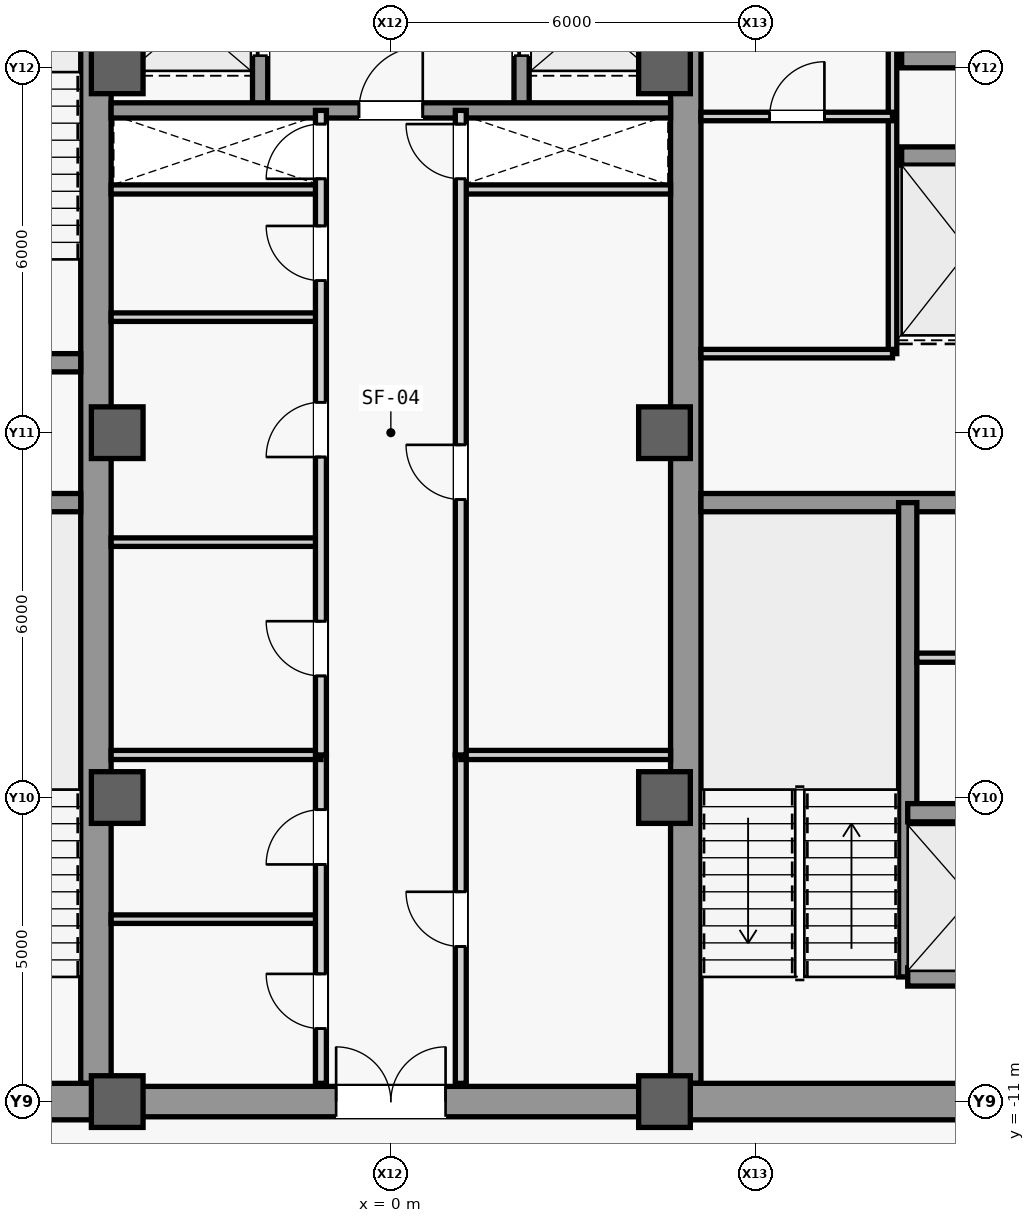
"""IFC4 building model, lengths in metres.
Left out: names, types, materials, properties, quantities, classifications, styles, units other than length and angle.
Written with IfcOpenShell. Run it as: python <this file> out.ifc"""

import sys

from ifc_helpers import new_model, si_unit, direction, frame, frame_2d, origin, origin_2d, place, context, subcontext, project, spatial, rectangle, extrude, source, transform, mapped, element, fill, save


model = new_model("IFC4")
c1 = context("Model", 3, precision=1e-05, world=origin(), true_north=direction((0.0, 1.0)))
c2 = subcontext(c1, "Body", "Model", "MODEL_VIEW")
j1 = project(units=[si_unit("LENGTHUNIT", "METRE"), si_unit("PLANEANGLEUNIT", "RADIAN")], contexts=[c1])
p1 = place(None, origin())
s1 = spatial("IfcSite", under=j1, at=p1, CompositionType="ELEMENT")
p2 = place(p1, origin())
s2 = spatial("IfcBuilding", under=s1, at=p2, CompositionType="ELEMENT")
p3 = place(p2, frame((0.0, 0.0, 259.1)))
s3 = spatial("IfcBuildingStorey", under=s2, at=p3, CompositionType="ELEMENT", Elevation=259.1)
m1 = source(origin(), c2, "Body", "SweptSolid", [
    extrude(rectangle(XDim=21.4, YDim=0.5, at=frame_2d((10.7, 0.0))), origin(), (0.0, 0.0, 1.0), 3.78),
])
for number, where, z_axis, x_axis in (
    (1, (-4.85, -10.7, 0.0), (0.0, 0.0, 1.0), (0.0, 1.0, 0.0)),
    (2, (4.85, -10.7, 0.0), (0.0, 0.0, 1.0), (0.0, 1.0, 0.0)),
):
    element("IfcWall", number, at=place(p3, frame(where, z_axis=z_axis, x_axis=x_axis)), inside=s3, PredefinedType="SHEAR", context=c2, shape_type="MappedRepresentation", body=[
        mapped(m1, transform((0.0, 0.0, 0.0), scale=1.0)),
    ])
m2 = source(origin(), c2, "Body", "SweptSolid", [
    extrude(rectangle(XDim=5.9, YDim=0.6, at=frame_2d((2.95, 0.0))), origin(), (0.0, 0.0, 1.0), 3.78),
])
for number, where, z_axis, x_axis in (
    (3, (-10.75, -11.0, 0.0), (0.0, 0.0, 1.0), (1.0, 0.0, 0.0)),
    (4, (4.85, -11.0, 0.0), (0.0, 0.0, 1.0), (1.0, 0.0, 0.0)),
):
    element("IfcWall", number, at=place(p3, frame(where, z_axis=z_axis, x_axis=x_axis)), inside=s3, PredefinedType="SHEAR", context=c2, shape_type="MappedRepresentation", body=[
        mapped(m2, transform((0.0, 0.0, 0.0), scale=1.0)),
    ])
m3 = source(origin(), c2, "Body", "SweptSolid", [
    extrude(rectangle(XDim=5.65, YDim=0.3, at=frame_2d((2.825, 0.0))), origin(), (0.0, 0.0, 1.0), 3.78),
])
for number, where, z_axis, x_axis in (
    (5, (-10.75, -1.15, 0.0), (0.0, 0.0, 1.0), (1.0, 0.0, 0.0)),
    (6, (-10.75, 1.15, 0.0), (0.0, 0.0, 1.0), (1.0, 0.0, 0.0)),
    (7, (5.1, -1.15, 0.0), (0.0, 0.0, 1.0), (1.0, 0.0, 0.0)),
):
    element("IfcWall", number, at=place(p3, frame(where, z_axis=z_axis, x_axis=x_axis)), inside=s3, PredefinedType="SHEAR", context=c2, shape_type="MappedRepresentation", body=[
        mapped(m3, transform((0.0, 0.0, 0.0), scale=1.0)),
    ])
m4 = source(origin(), c2, "Body", "SweptSolid", [
    extrude(rectangle(XDim=9.2, YDim=0.5, at=frame_2d((4.6, 0.0))), origin(), (0.0, 0.0, 1.0), 3.78),
])
p4 = place(p3, frame((-4.6, -11.0, 0.0), z_axis=(0.0, 0.0, 1.0), x_axis=(1.0, 0.0, 0.0)))
e8 = element("IfcWall", 8, at=p4, inside=s3, PredefinedType="SHEAR", context=c2, shape_type="MappedRepresentation", body=[
    mapped(m4, transform((0.0, 0.0, 0.0), scale=1.0)),
])
m5 = source(origin(), c2, "Body", "SweptSolid", [
    extrude(rectangle(XDim=1.8, YDim=2.25, at=frame_2d((0.9, 1.125))), frame((0.0, 0.26, 0.0), z_axis=(0.0, -1.0, 0.0), x_axis=(1.0, 0.0, 0.0)), (0.0, 0.0, 1.0), 0.52),
])
p5 = place(p4, frame((3.7, 0.0, 0.0)))
e9 = element("IfcOpeningElement", 9, at=p5, cuts=e8, PredefinedType="OPENING", context=c2, shape_type="MappedRepresentation", body=[
    mapped(m5, transform((0.0, 0.0, 0.0), scale=1.0)),
])
m6 = source(origin(), c2, "Body", "SweptSolid", [
    extrude(rectangle(XDim=0.85, YDim=0.85, at=origin_2d()), origin(), (0.0, 0.0, 1.0), 4.0),
])
for number, where, z_axis, x_axis in (
    (10, (-4.5, -11.0, 0.0), (0.0, 0.0, 1.0), (1.0, 0.0, 0.0)),
    (11, (-4.5, -6.0, 0.0), (0.0, 0.0, 1.0), (1.0, 0.0, 0.0)),
    (12, (-4.5, 0.0, 0.0), (0.0, 0.0, 1.0), (1.0, 0.0, 0.0)),
    (13, (-4.5, 6.0, 0.0), (0.0, 0.0, 1.0), (1.0, 0.0, 0.0)),
    (14, (4.5, -11.0, 0.0), (0.0, 0.0, 1.0), (1.0, 0.0, 0.0)),
    (15, (4.5, -6.0, 0.0), (0.0, 0.0, 1.0), (1.0, 0.0, 0.0)),
    (16, (4.5, 0.0, 0.0), (0.0, 0.0, 1.0), (1.0, 0.0, 0.0)),
    (17, (4.5, 6.0, 0.0), (0.0, 0.0, 1.0), (1.0, 0.0, 0.0)),
):
    element("IfcColumn", number, at=place(p3, frame(where, z_axis=z_axis, x_axis=x_axis)), inside=s3, PredefinedType="COLUMN", context=c2, shape_type="MappedRepresentation", body=[
        mapped(m6, transform((0.0, 0.0, 0.0), scale=1.0)),
    ])
m7 = source(origin(), c2, "Body", "SweptSolid", [
    extrude(rectangle(XDim=7.8, YDim=0.3, at=frame_2d((3.9, 0.0))), origin(), (0.0, 0.0, 1.0), 3.78),
])
p6 = place(p3, frame((8.5, -8.95, 0.0), z_axis=(0.0, 0.0, 1.0), x_axis=(0.0, 1.0, 0.0)))
e18 = element("IfcWall", 18, at=p6, inside=s3, PredefinedType="SHEAR", context=c2, shape_type="MappedRepresentation", body=[
    mapped(m7, transform((0.0, 0.0, 0.0), scale=1.0)),
])
m8 = source(origin(), c2, "Body", "SweptSolid", [
    extrude(rectangle(XDim=2.2, YDim=0.3, at=frame_2d((1.1, 0.0))), origin(), (0.0, 0.0, 1.0), 3.78),
])
for number, where, z_axis, x_axis in (
    (19, (8.5, -8.95, 0.0), (0.0, 0.0, 1.0), (1.0, 0.0, 0.0)),
    (20, (8.5, -6.25, 0.0), (0.0, 0.0, 1.0), (1.0, 0.0, 0.0)),
):
    element("IfcWall", number, at=place(p3, frame(where, z_axis=z_axis, x_axis=x_axis)), inside=s3, PredefinedType="SHEAR", context=c2, shape_type="MappedRepresentation", body=[
        mapped(m8, transform((0.0, 0.0, 0.0), scale=1.0)),
    ])
m9 = source(origin(), c2, "Body", "SweptSolid", [
    extrude(rectangle(XDim=2.3, YDim=0.3, at=frame_2d((1.15, 0.0))), origin(), (0.0, 0.0, 1.0), 3.78),
])
for number, where, z_axis, x_axis in (
    (21, (8.4, 4.55, 0.0), (0.0, 0.0, 1.0), (1.0, 0.0, 0.0)),
    (22, (8.4, 6.15, 0.0), (0.0, 0.0, 1.0), (1.0, 0.0, 0.0)),
):
    element("IfcWall", number, at=place(p3, frame(where, z_axis=z_axis, x_axis=x_axis)), inside=s3, PredefinedType="SHEAR", context=c2, shape_type="MappedRepresentation", body=[
        mapped(m9, transform((0.0, 0.0, 0.0), scale=1.0)),
    ])
m10 = source(origin(), c2, "Body", "SweptSolid", [
    extrude(rectangle(XDim=2.05, YDim=0.15, at=frame_2d((1.025, 0.0))), origin(), (0.0, 0.0, 1.0), 3.78),
])
p7 = place(p3, frame((8.65, -3.7, 0.0), z_axis=(0.0, 0.0, 1.0), x_axis=(1.0, 0.0, 0.0)))
e23 = element("IfcWall", 23, at=p7, inside=s3, PredefinedType="PARTITIONING", context=c2, shape_type="MappedRepresentation", body=[
    mapped(m10, transform((0.0, 0.0, 0.0), scale=1.0)),
])
m11 = source(origin(), c2, "Body", "SweptSolid", [
    extrude(rectangle(XDim=9.4, YDim=0.14, at=frame_2d((4.7, 0.0))), origin(), (0.0, 0.0, 1.0), 3.78),
])
p8 = place(p3, frame((8.25, 1.3, 0.0), z_axis=(0.0, 0.0, 1.0), x_axis=(0.0, 1.0, 0.0)))
e24 = element("IfcWall", 24, at=p8, inside=s3, PredefinedType="PARTITIONING", context=c2, shape_type="MappedRepresentation", body=[
    mapped(m11, transform((0.0, 0.0, 0.0), scale=1.0)),
])
m12 = source(origin(), c2, "Body", "SweptSolid", [
    extrude(rectangle(XDim=3.15, YDim=0.14, at=frame_2d((1.575, 0.0))), origin(), (0.0, 0.0, 1.0), 3.78),
])
p9 = place(p3, frame((5.1, 1.3, 0.0), z_axis=(0.0, 0.0, 1.0), x_axis=(1.0, 0.0, 0.0)))
e25 = element("IfcWall", 25, at=p9, inside=s3, PredefinedType="PARTITIONING", context=c2, shape_type="MappedRepresentation", body=[
    mapped(m12, transform((0.0, 0.0, 0.0), scale=1.0)),
])
p10 = place(p3, frame((5.1, 5.2, 0.0), z_axis=(0.0, 0.0, 1.0), x_axis=(1.0, 0.0, 0.0)))
e26 = element("IfcWall", 26, at=p10, inside=s3, PredefinedType="PARTITIONING", context=c2, shape_type="MappedRepresentation", body=[
    mapped(m12, transform((0.0, 0.0, 0.0), scale=1.0)),
])
m13 = source(origin(), c2, "Body", "SweptSolid", [
    extrude(rectangle(XDim=0.9, YDim=2.15, at=frame_2d((0.45, 1.075))), frame((0.0, 0.08, 0.0), z_axis=(0.0, -1.0, 0.0), x_axis=(1.0, 0.0, 0.0)), (0.0, 0.0, 1.0), 0.16),
])
p11 = place(p10, frame((1.13, 0.0, 0.0)))
e27 = element("IfcOpeningElement", 27, at=p11, cuts=e26, PredefinedType="OPENING", context=c2, shape_type="MappedRepresentation", body=[
    mapped(m13, transform((0.0, 0.0, 0.0), scale=1.0)),
])
m14 = source(origin(), c2, "Body", "SweptSolid", [
    extrude(rectangle(XDim=3.45, YDim=0.15, at=frame_2d((1.725, 0.0))), origin(), (0.0, 0.0, 1.0), 3.78),
])
for number, where, z_axis, x_axis in (
    (28, (-4.6, 4.0, 0.0), (0.0, 0.0, 1.0), (1.0, 0.0, 0.0)),
    (29, (1.15, 4.0, 0.0), (0.0, 0.0, 1.0), (1.0, 0.0, 0.0)),
):
    element("IfcWall", number, at=place(p3, frame(where, z_axis=z_axis, x_axis=x_axis)), inside=s3, PredefinedType="PARTITIONING", context=c2, shape_type="MappedRepresentation", body=[
        mapped(m14, transform((0.0, 0.0, 0.0), scale=1.0)),
    ])
m15 = source(origin(), c2, "Body", "SweptSolid", [
    extrude(rectangle(XDim=3.45, YDim=0.14, at=frame_2d((1.725, 0.0))), origin(), (0.0, 0.0, 1.0), 3.78),
])
p12 = place(p3, frame((-4.6, -8.0, 0.0), z_axis=(0.0, 0.0, 1.0), x_axis=(1.0, 0.0, 0.0)))
e30 = element("IfcWall", 30, at=p12, inside=s3, PredefinedType="PARTITIONING", context=c2, shape_type="MappedRepresentation", body=[
    mapped(m15, transform((0.0, 0.0, 0.0), scale=1.0)),
])
m16 = source(origin(), c2, "Body", "SweptSolid", [
    extrude(rectangle(XDim=5.4, YDim=0.18, at=frame_2d((2.7, 0.0))), origin(), (0.0, 0.0, 1.0), 3.78),
])
p13 = place(p3, frame((-1.15, -10.7, 0.0), z_axis=(0.0, 0.0, 1.0), x_axis=(0.0, 1.0, 0.0)))
e31 = element("IfcWall", 31, at=p13, inside=s3, PredefinedType="PARTITIONING", context=c2, shape_type="MappedRepresentation", body=[
    mapped(m16, transform((0.0, 0.0, 0.0), scale=1.0)),
])
m17 = source(origin(), c2, "Body", "SweptSolid", [
    extrude(rectangle(XDim=0.9, YDim=2.15, at=frame_2d((0.45, 1.075))), frame((0.0, 0.1, 0.0), z_axis=(0.0, -1.0, 0.0), x_axis=(1.0, 0.0, 0.0)), (0.0, 0.0, 1.0), 0.2),
])
p14 = place(p13, frame((0.9, 0.0, 0.0)))
e32 = element("IfcOpeningElement", 32, at=p14, cuts=e31, PredefinedType="OPENING", context=c2, shape_type="MappedRepresentation", body=[
    mapped(m17, transform((0.0, 0.0, 0.0), scale=1.0)),
])
p15 = place(p13, frame((3.6, 0.0, 0.0)))
e33 = element("IfcOpeningElement", 33, at=p15, cuts=e31, PredefinedType="OPENING", context=c2, shape_type="MappedRepresentation", body=[
    mapped(m17, transform((0.0, 0.0, 0.0), scale=1.0)),
])
p16 = place(p3, frame((1.15, -10.7, 0.0), z_axis=(0.0, 0.0, 1.0), x_axis=(0.0, 1.0, 0.0)))
e34 = element("IfcWall", 34, at=p16, inside=s3, PredefinedType="PARTITIONING", context=c2, shape_type="MappedRepresentation", body=[
    mapped(m16, transform((0.0, 0.0, 0.0), scale=1.0)),
])
p17 = place(p16, frame((2.25, 0.0, 0.0)))
e35 = element("IfcOpeningElement", 35, at=p17, cuts=e34, PredefinedType="OPENING", context=c2, shape_type="MappedRepresentation", body=[
    mapped(m17, transform((0.0, 0.0, 0.0), scale=1.0)),
])
for number, where, z_axis, x_axis in (
    (36, (-4.6, -5.3, 0.0), (0.0, 0.0, 1.0), (1.0, 0.0, 0.0)),
    (37, (1.15, -5.3, 0.0), (0.0, 0.0, 1.0), (1.0, 0.0, 0.0)),
):
    element("IfcWall", number, at=place(p3, frame(where, z_axis=z_axis, x_axis=x_axis)), inside=s3, PredefinedType="PARTITIONING", context=c2, shape_type="MappedRepresentation", body=[
        mapped(m14, transform((0.0, 0.0, 0.0), scale=1.0)),
    ])
m18 = source(origin(), c2, "Body", "SweptSolid", [
    extrude(rectangle(XDim=5.4, YDim=0.25, at=frame_2d((2.7, 0.0))), origin(), (0.0, 0.0, 1.0), 3.78),
])
p18 = place(p3, frame((-2.15, 5.3, 0.0), z_axis=(0.0, 0.0, 1.0), x_axis=(0.0, 1.0, 0.0)))
e38 = element("IfcWall", 38, at=p18, inside=s3, PredefinedType="SHEAR", context=c2, shape_type="MappedRepresentation", body=[
    mapped(m18, transform((0.0, 0.0, 0.0), scale=1.0)),
])
m19 = source(origin(), c2, "Body", "SweptSolid", [
    extrude(rectangle(XDim=1.2, YDim=2.3, at=frame_2d((0.6, 1.15))), frame((0.0, 0.135, 0.0), z_axis=(0.0, -1.0, 0.0), x_axis=(1.0, 0.0, 0.0)), (0.0, 0.0, 1.0), 0.27),
])
p19 = place(p18, frame((3.3, 0.0, 0.0)))
e39 = element("IfcOpeningElement", 39, at=p19, cuts=e38, PredefinedType="OPENING", context=c2, shape_type="MappedRepresentation", body=[
    mapped(m19, transform((0.0, 0.0, 0.0), scale=1.0)),
])
p20 = place(p18, frame((0.9, 0.0, 0.0)))
e40 = element("IfcOpeningElement", 40, at=p20, cuts=e38, PredefinedType="OPENING", context=c2, shape_type="MappedRepresentation", body=[
    mapped(m19, transform((0.0, 0.0, 0.0), scale=1.0)),
])
p21 = place(p3, frame((2.15, 5.3, 0.0), z_axis=(0.0, 0.0, 1.0), x_axis=(0.0, 1.0, 0.0)))
e41 = element("IfcWall", 41, at=p21, inside=s3, PredefinedType="SHEAR", context=c2, shape_type="MappedRepresentation", body=[
    mapped(m18, transform((0.0, 0.0, 0.0), scale=1.0)),
])
p22 = place(p21, frame((3.3, 0.0, 0.0)))
e42 = element("IfcOpeningElement", 42, at=p22, cuts=e41, PredefinedType="OPENING", context=c2, shape_type="MappedRepresentation", body=[
    mapped(m19, transform((0.0, 0.0, 0.0), scale=1.0)),
])
p23 = place(p21, frame((0.9, 0.0, 0.0)))
e43 = element("IfcOpeningElement", 43, at=p23, cuts=e41, PredefinedType="OPENING", context=c2, shape_type="MappedRepresentation", body=[
    mapped(m19, transform((0.0, 0.0, 0.0), scale=1.0)),
])
m20 = source(origin(), c2, "Body", "SweptSolid", [
    extrude(rectangle(XDim=9.2, YDim=0.25, at=frame_2d((4.6, 0.0))), origin(), (0.0, 0.0, 1.0), 3.78),
])
p24 = place(p3, frame((-4.6, 5.3, 0.0), z_axis=(0.0, 0.0, 1.0), x_axis=(1.0, 0.0, 0.0)))
e44 = element("IfcWall", 44, at=p24, inside=s3, PredefinedType="SHEAR", context=c2, shape_type="MappedRepresentation", body=[
    mapped(m20, transform((0.0, 0.0, 0.0), scale=1.0)),
])
m21 = source(origin(), c2, "Body", "SweptSolid", [
    extrude(rectangle(XDim=1.05, YDim=2.2, at=frame_2d((0.525, 1.1))), frame((0.0, 0.135, 0.0), z_axis=(0.0, -1.0, 0.0), x_axis=(1.0, 0.0, 0.0)), (0.0, 0.0, 1.0), 0.27),
])
p25 = place(p24, frame((4.075, 0.0, 0.0)))
e45 = element("IfcOpeningElement", 45, at=p25, cuts=e44, PredefinedType="OPENING", context=c2, shape_type="MappedRepresentation", body=[
    mapped(m21, transform((0.0, 0.0, 0.0), scale=1.0)),
])
for number, where, z_axis, x_axis in (
    (46, (-4.6, -1.8, 0.0), (0.0, 0.0, 1.0), (1.0, 0.0, 0.0)),
    (47, (-4.6, 1.9, 0.0), (0.0, 0.0, 1.0), (1.0, 0.0, 0.0)),
):
    element("IfcWall", number, at=place(p3, frame(where, z_axis=z_axis, x_axis=x_axis)), inside=s3, PredefinedType="PARTITIONING", context=c2, shape_type="MappedRepresentation", body=[
        mapped(m15, transform((0.0, 0.0, 0.0), scale=1.0)),
    ])
m22 = source(origin(), c2, "Body", "SweptSolid", [
    extrude(rectangle(XDim=10.6, YDim=0.18, at=frame_2d((5.3, 0.0))), origin(), (0.0, 0.0, 1.0), 3.78),
])
p26 = place(p3, frame((-1.15, -5.3, 0.0), z_axis=(0.0, 0.0, 1.0), x_axis=(0.0, 1.0, 0.0)))
e48 = element("IfcWall", 48, at=p26, inside=s3, PredefinedType="PARTITIONING", context=c2, shape_type="MappedRepresentation", body=[
    mapped(m22, transform((0.0, 0.0, 0.0), scale=1.0)),
])
p27 = place(p26, frame((1.3, 0.0, 0.0)))
e49 = element("IfcOpeningElement", 49, at=p27, cuts=e48, PredefinedType="OPENING", context=c2, shape_type="MappedRepresentation", body=[
    mapped(m17, transform((0.0, 0.0, 0.0), scale=1.0)),
])
p28 = place(p26, frame((4.9, 0.0, 0.0)))
e50 = element("IfcOpeningElement", 50, at=p28, cuts=e48, PredefinedType="OPENING", context=c2, shape_type="MappedRepresentation", body=[
    mapped(m17, transform((0.0, 0.0, 0.0), scale=1.0)),
])
p29 = place(p26, frame((7.8, 0.0, 0.0)))
e51 = element("IfcOpeningElement", 51, at=p29, cuts=e48, PredefinedType="OPENING", context=c2, shape_type="MappedRepresentation", body=[
    mapped(m17, transform((0.0, 0.0, 0.0), scale=1.0)),
])
p30 = place(p26, frame((9.475, 0.0, 0.0)))
e52 = element("IfcOpeningElement", 52, at=p30, cuts=e48, PredefinedType="OPENING", context=c2, shape_type="MappedRepresentation", body=[
    mapped(m17, transform((0.0, 0.0, 0.0), scale=1.0)),
])
p31 = place(p3, frame((1.15, -5.3, 0.0), z_axis=(0.0, 0.0, 1.0), x_axis=(0.0, 1.0, 0.0)))
e53 = element("IfcWall", 53, at=p31, inside=s3, PredefinedType="PARTITIONING", context=c2, shape_type="MappedRepresentation", body=[
    mapped(m22, transform((0.0, 0.0, 0.0), scale=1.0)),
])
p32 = place(p31, frame((4.2, 0.0, 0.0)))
e54 = element("IfcOpeningElement", 54, at=p32, cuts=e53, PredefinedType="OPENING", context=c2, shape_type="MappedRepresentation", body=[
    mapped(m17, transform((0.0, 0.0, 0.0), scale=1.0)),
])
p33 = place(p31, frame((9.475, 0.0, 0.0)))
e55 = element("IfcOpeningElement", 55, at=p33, cuts=e53, PredefinedType="OPENING", context=c2, shape_type="MappedRepresentation", body=[
    mapped(m17, transform((0.0, 0.0, 0.0), scale=1.0)),
])
m23 = source(origin(), c2, "Body", "SweptSolid", [
    extrude(rectangle(XDim=0.9, YDim=2.15, at=frame_2d((0.45, 1.075))), frame((0.0, 0.025, 0.0), z_axis=(0.0, -1.0, 0.0), x_axis=(1.0, 0.0, 0.0)), (0.0, 0.0, 1.0), 0.05),
])
p34 = place(p11, origin())
e56 = element("IfcDoor", 56, at=p34, inside=s3, OperationType="SINGLE_SWING_RIGHT", PredefinedType="DOOR", context=c2, shape_type="MappedRepresentation", body=[
    mapped(m23, transform((0.0, 0.0, 0.0), scale=1.0)),
])
fill(e27, e56)
p35 = place(p14, origin())
e57 = element("IfcDoor", 57, at=p35, inside=s3, OperationType="SINGLE_SWING_RIGHT", PredefinedType="DOOR", context=c2, shape_type="MappedRepresentation", body=[
    mapped(m23, transform((0.0, 0.0, 0.0), scale=1.0)),
])
fill(e32, e57)
p36 = place(p15, origin())
e58 = element("IfcDoor", 58, at=p36, inside=s3, OperationType="SINGLE_SWING_LEFT", PredefinedType="DOOR", context=c2, shape_type="MappedRepresentation", body=[
    mapped(m23, transform((0.0, 0.0, 0.0), scale=1.0)),
])
fill(e33, e58)
p37 = place(p17, origin())
e59 = element("IfcDoor", 59, at=p37, inside=s3, OperationType="SINGLE_SWING_RIGHT", PredefinedType="DOOR", context=c2, shape_type="MappedRepresentation", body=[
    mapped(m23, transform((0.0, 0.0, 0.0), scale=1.0)),
])
fill(e35, e59)
m24 = source(origin(), c2, "Body", "SweptSolid", [
    extrude(rectangle(XDim=1.8, YDim=2.25, at=frame_2d((0.9, 1.125))), frame((0.0, 0.025, 0.0), z_axis=(0.0, -1.0, 0.0), x_axis=(1.0, 0.0, 0.0)), (0.0, 0.0, 1.0), 0.05),
])
p38 = place(p5, origin())
e60 = element("IfcDoor", 60, at=p38, inside=s3, OperationType="SINGLE_SWING_LEFT", PredefinedType="DOOR", context=c2, shape_type="MappedRepresentation", body=[
    mapped(m24, transform((0.0, 0.0, 0.0), scale=1.0)),
])
fill(e9, e60)
m25 = source(origin(), c2, "Body", "SweptSolid", [
    extrude(rectangle(XDim=1.05, YDim=2.2, at=frame_2d((0.525, 1.1))), frame((0.0, 0.025, 0.0), z_axis=(0.0, -1.0, 0.0), x_axis=(1.0, 0.0, 0.0)), (0.0, 0.0, 1.0), 0.05),
])
p39 = place(p25, origin())
e61 = element("IfcDoor", 61, at=p39, inside=s3, OperationType="SINGLE_SWING_RIGHT", PredefinedType="DOOR", context=c2, shape_type="MappedRepresentation", body=[
    mapped(m25, transform((0.0, 0.0, 0.0), scale=1.0)),
])
fill(e45, e61)
p40 = place(p27, origin())
e62 = element("IfcDoor", 62, at=p40, inside=s3, OperationType="SINGLE_SWING_RIGHT", PredefinedType="DOOR", context=c2, shape_type="MappedRepresentation", body=[
    mapped(m23, transform((0.0, 0.0, 0.0), scale=1.0)),
])
fill(e49, e62)
p41 = place(p28, origin())
e63 = element("IfcDoor", 63, at=p41, inside=s3, OperationType="SINGLE_SWING_LEFT", PredefinedType="DOOR", context=c2, shape_type="MappedRepresentation", body=[
    mapped(m23, transform((0.0, 0.0, 0.0), scale=1.0)),
])
fill(e50, e63)
p42 = place(p29, origin())
e64 = element("IfcDoor", 64, at=p42, inside=s3, OperationType="SINGLE_SWING_RIGHT", PredefinedType="DOOR", context=c2, shape_type="MappedRepresentation", body=[
    mapped(m23, transform((0.0, 0.0, 0.0), scale=1.0)),
])
fill(e51, e64)
p43 = place(p32, origin())
e65 = element("IfcDoor", 65, at=p43, inside=s3, OperationType="SINGLE_SWING_RIGHT", PredefinedType="DOOR", context=c2, shape_type="MappedRepresentation", body=[
    mapped(m23, transform((0.0, 0.0, 0.0), scale=1.0)),
])
fill(e54, e65)
p44 = place(p30, origin())
e66 = element("IfcDoor", 66, at=p44, inside=s3, OperationType="SINGLE_SWING_LEFT", PredefinedType="DOOR", context=c2, shape_type="MappedRepresentation", body=[
    mapped(m23, transform((0.0, 0.0, 0.0), scale=1.0)),
])
fill(e52, e66)
p45 = place(p33, origin())
e67 = element("IfcDoor", 67, at=p45, inside=s3, OperationType="SINGLE_SWING_RIGHT", PredefinedType="DOOR", context=c2, shape_type="MappedRepresentation", body=[
    mapped(m23, transform((0.0, 0.0, 0.0), scale=1.0)),
])
fill(e55, e67)
m26 = source(origin(), c2, "Body", "SweptSolid", [
    extrude(rectangle(XDim=1.2, YDim=2.3, at=frame_2d((0.6, 1.15))), frame((0.0, 0.025, 0.0), z_axis=(0.0, -1.0, 0.0), x_axis=(1.0, 0.0, 0.0)), (0.0, 0.0, 1.0), 0.05),
])
p46 = place(p20, origin())
e68 = element("IfcDoor", 68, at=p46, inside=s3, OperationType="SLIDING_TO_LEFT", PredefinedType="DOOR", context=c2, shape_type="MappedRepresentation", body=[
    mapped(m26, transform((0.0, 0.0, 0.0), scale=1.0)),
])
fill(e40, e68)
p47 = place(p23, origin())
e69 = element("IfcDoor", 69, at=p47, inside=s3, OperationType="SLIDING_TO_LEFT", PredefinedType="DOOR", context=c2, shape_type="MappedRepresentation", body=[
    mapped(m26, transform((0.0, 0.0, 0.0), scale=1.0)),
])
fill(e43, e69)
save(model, sys.argv[1])
